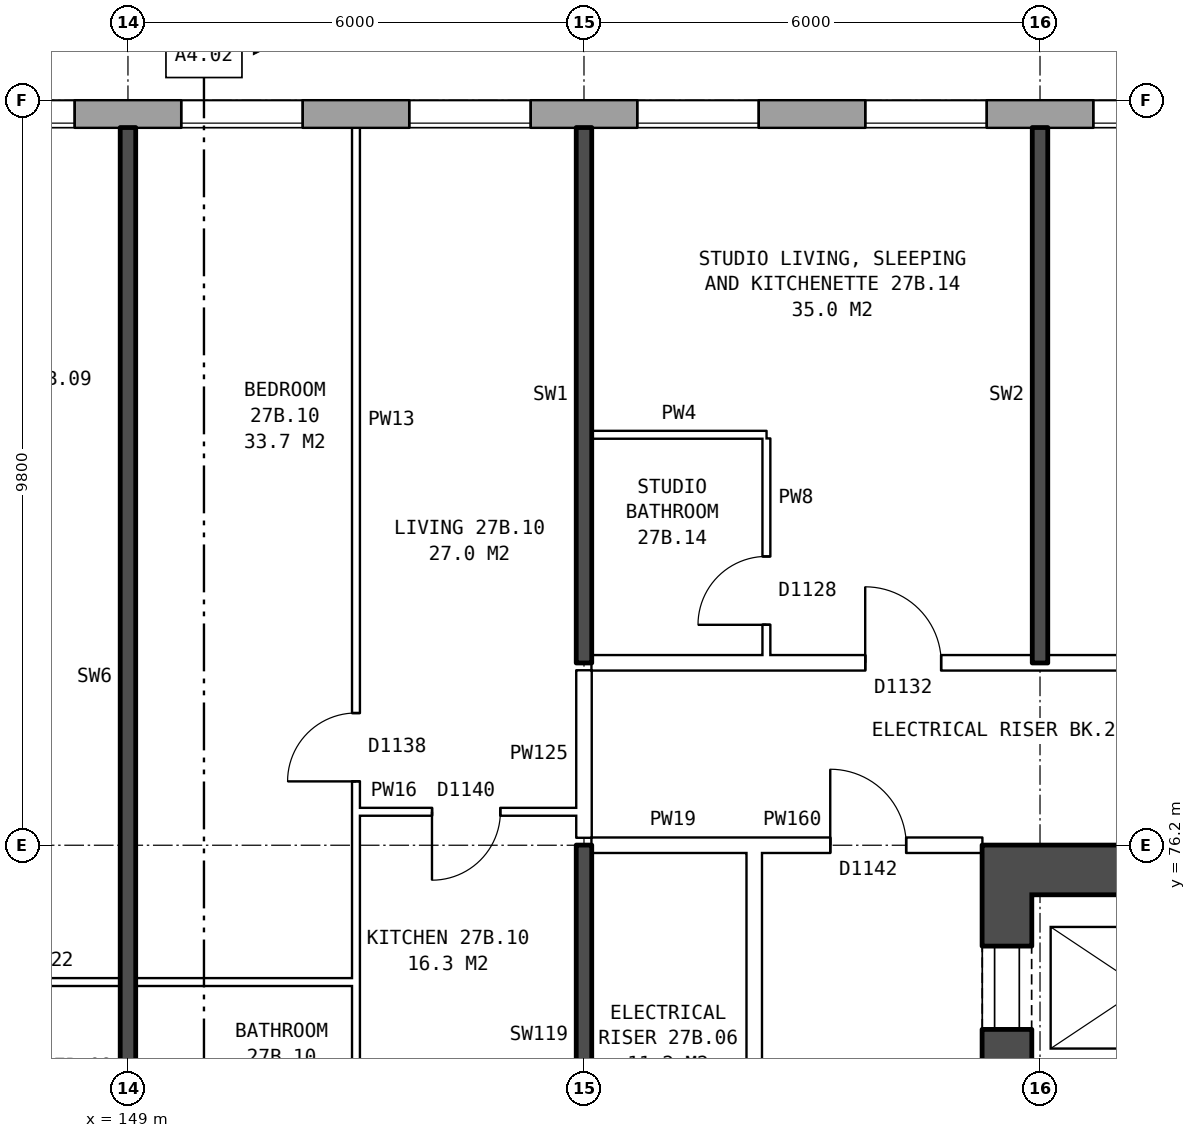
"""IFC4 building model, lengths in metres.
Left out: names, types, materials, properties, quantities, classifications, styles, units other than length and angle.
Written with IfcOpenShell. Run it as: python <this file> out.ifc"""

import sys

from ifc_helpers import new_model, si_unit, direction, frame, frame_2d, origin, place, context, subcontext, project, spatial, rectangle, extrude, element, fill, save


model = new_model("IFC4")
c1 = context("Model", 3, precision=1e-05, world=origin(), true_north=direction((0.0, 1.0)))
c2 = subcontext(c1, "Body", "Model", "MODEL_VIEW")
j1 = project(units=[si_unit("LENGTHUNIT", "METRE"), si_unit("PLANEANGLEUNIT", "RADIAN")], contexts=[c1])
p1 = place(None, origin())
s1 = spatial("IfcSite", under=j1, at=p1, CompositionType="ELEMENT")
p2 = place(p1, origin())
s2 = spatial("IfcBuilding", under=s1, at=p2, CompositionType="ELEMENT")
p3 = place(p2, frame((0.0, 0.0, 99.5)))
s3 = spatial("IfcBuildingStorey", under=s2, at=p3, CompositionType="ELEMENT", Elevation=99.5)
p4 = place(p3, frame((170.925, 85.82, 0.0), z_axis=(0.0, 0.0, 1.0), x_axis=(-1.0, 0.0, 0.0)))
e1 = element("IfcWall", 1, at=p4, inside=s3, PredefinedType="STANDARD", context=c2, shape_type="SweptSolid", body=[
    extrude(rectangle(XDim=36.851, YDim=0.36, at=frame_2d((18.425, 0.0))), origin(), (0.0, 0.0, 1.0), 2.85),
])
p5 = place(p4, frame((0.3, 0.0, 0.8)))
e2 = element("IfcOpeningElement", 2, at=p5, cuts=e1, PredefinedType="OPENING", context=c2, shape_type="SweptSolid", body=[
    extrude(rectangle(XDim=1.0, YDim=1.8, at=frame_2d((0.5, 0.9))), frame((0.0, 0.19, 0.0), z_axis=(0.0, -1.0, 0.0), x_axis=(1.0, 0.0, 0.0)), (0.0, 0.0, 1.0), 0.38),
])
p6 = place(p4, frame((4.625, 0.0, 0.8)))
e3 = element("IfcOpeningElement", 3, at=p6, cuts=e1, PredefinedType="OPENING", context=c2, shape_type="SweptSolid", body=[
    extrude(rectangle(XDim=1.6, YDim=1.8, at=frame_2d((0.8, 0.9))), frame((0.0, 0.19, 0.0), z_axis=(0.0, -1.0, 0.0), x_axis=(1.0, 0.0, 0.0)), (0.0, 0.0, 1.0), 0.38),
])
p7 = place(p4, frame((7.625, 0.0, 0.8)))
e4 = element("IfcOpeningElement", 4, at=p7, cuts=e1, PredefinedType="OPENING", context=c2, shape_type="SweptSolid", body=[
    extrude(rectangle(XDim=1.6, YDim=1.8, at=frame_2d((0.8, 0.9))), frame((0.0, 0.19, 0.0), z_axis=(0.0, -1.0, 0.0), x_axis=(1.0, 0.0, 0.0)), (0.0, 0.0, 1.0), 0.38),
])
p8 = place(p4, frame((10.625, 0.0, 0.8)))
e5 = element("IfcOpeningElement", 5, at=p8, cuts=e1, PredefinedType="OPENING", context=c2, shape_type="SweptSolid", body=[
    extrude(rectangle(XDim=1.6, YDim=1.8, at=frame_2d((0.8, 0.9))), frame((0.0, 0.19, 0.0), z_axis=(0.0, -1.0, 0.0), x_axis=(1.0, 0.0, 0.0)), (0.0, 0.0, 1.0), 0.38),
])
p9 = place(p4, frame((13.625, 0.0, 0.8)))
e6 = element("IfcOpeningElement", 6, at=p9, cuts=e1, PredefinedType="OPENING", context=c2, shape_type="SweptSolid", body=[
    extrude(rectangle(XDim=1.6, YDim=1.8, at=frame_2d((0.8, 0.9))), frame((0.0, 0.19, 0.0), z_axis=(0.0, -1.0, 0.0), x_axis=(1.0, 0.0, 0.0)), (0.0, 0.0, 1.0), 0.38),
])
p10 = place(p4, frame((16.625, 0.0, 0.8)))
e7 = element("IfcOpeningElement", 7, at=p10, cuts=e1, PredefinedType="OPENING", context=c2, shape_type="SweptSolid", body=[
    extrude(rectangle(XDim=1.6, YDim=1.8, at=frame_2d((0.8, 0.9))), frame((0.0, 0.19, 0.0), z_axis=(0.0, -1.0, 0.0), x_axis=(1.0, 0.0, 0.0)), (0.0, 0.0, 1.0), 0.38),
])
p11 = place(p4, frame((19.625, 0.0, 0.8)))
e8 = element("IfcOpeningElement", 8, at=p11, cuts=e1, PredefinedType="OPENING", context=c2, shape_type="SweptSolid", body=[
    extrude(rectangle(XDim=1.6, YDim=1.8, at=frame_2d((0.8, 0.9))), frame((0.0, 0.19, 0.0), z_axis=(0.0, -1.0, 0.0), x_axis=(1.0, 0.0, 0.0)), (0.0, 0.0, 1.0), 0.38),
])
p12 = place(p4, frame((22.625, 0.0, 0.8)))
e9 = element("IfcOpeningElement", 9, at=p12, cuts=e1, PredefinedType="OPENING", context=c2, shape_type="SweptSolid", body=[
    extrude(rectangle(XDim=1.6, YDim=1.8, at=frame_2d((0.8, 0.9))), frame((0.0, 0.19, 0.0), z_axis=(0.0, -1.0, 0.0), x_axis=(1.0, 0.0, 0.0)), (0.0, 0.0, 1.0), 0.38),
])
p13 = place(p4, frame((25.625, 0.0, 0.8)))
e10 = element("IfcOpeningElement", 10, at=p13, cuts=e1, PredefinedType="OPENING", context=c2, shape_type="SweptSolid", body=[
    extrude(rectangle(XDim=1.6, YDim=1.8, at=frame_2d((0.8, 0.9))), frame((0.0, 0.19, 0.0), z_axis=(0.0, -1.0, 0.0), x_axis=(1.0, 0.0, 0.0)), (0.0, 0.0, 1.0), 0.38),
])
p14 = place(p4, frame((28.625, 0.0, 0.8)))
e11 = element("IfcOpeningElement", 11, at=p14, cuts=e1, PredefinedType="OPENING", context=c2, shape_type="SweptSolid", body=[
    extrude(rectangle(XDim=1.6, YDim=1.8, at=frame_2d((0.8, 0.9))), frame((0.0, 0.19, 0.0), z_axis=(0.0, -1.0, 0.0), x_axis=(1.0, 0.0, 0.0)), (0.0, 0.0, 1.0), 0.38),
])
p15 = place(p4, frame((30.525, 0.0, 0.8)))
e12 = element("IfcOpeningElement", 12, at=p15, cuts=e1, PredefinedType="OPENING", context=c2, shape_type="SweptSolid", body=[
    extrude(rectangle(XDim=1.6, YDim=1.8, at=frame_2d((0.8, 0.9))), frame((0.0, 0.19, 0.0), z_axis=(0.0, -1.0, 0.0), x_axis=(1.0, 0.0, 0.0)), (0.0, 0.0, 1.0), 0.38),
])
p16 = place(p4, frame((34.425, 0.0, 1.7)))
e13 = element("IfcOpeningElement", 13, at=p16, cuts=e1, PredefinedType="OPENING", context=c2, shape_type="SweptSolid", body=[
    extrude(rectangle(XDim=0.8, YDim=0.9, at=frame_2d((0.4, 0.45))), frame((0.0, 0.19, 0.0), z_axis=(0.0, -1.0, 0.0), x_axis=(1.0, 0.0, 0.0)), (0.0, 0.0, 1.0), 0.38),
])
p17 = place(p4, frame((1.6, 0.0, 1.7)))
e14 = element("IfcOpeningElement", 14, at=p17, cuts=e1, PredefinedType="OPENING", context=c2, shape_type="SweptSolid", body=[
    extrude(rectangle(XDim=0.8, YDim=0.9, at=frame_2d((0.4, 0.45))), frame((0.0, 0.19, 0.0), z_axis=(0.0, -1.0, 0.0), x_axis=(1.0, 0.0, 0.0)), (0.0, 0.0, 1.0), 0.38),
])
p18 = place(p4, frame((32.425, 0.0, 0.8)))
e15 = element("IfcOpeningElement", 15, at=p18, cuts=e1, PredefinedType="OPENING", context=c2, shape_type="SweptSolid", body=[
    extrude(rectangle(XDim=0.8, YDim=0.9, at=frame_2d((0.4, 0.45))), frame((0.0, 0.19, 0.0), z_axis=(0.0, -1.0, 0.0), x_axis=(1.0, 0.0, 0.0)), (0.0, 0.0, 1.0), 0.38),
])
p19 = place(p4, frame((35.525, 0.0, 0.8)))
e16 = element("IfcOpeningElement", 16, at=p19, cuts=e1, PredefinedType="OPENING", context=c2, shape_type="SweptSolid", body=[
    extrude(rectangle(XDim=1.0, YDim=1.8, at=frame_2d((0.5, 0.9))), frame((0.0, 0.19, 0.0), z_axis=(0.0, -1.0, 0.0), x_axis=(1.0, 0.0, 0.0)), (0.0, 0.0, 1.0), 0.38),
])
p20 = place(p3, frame((160.565, 75.55, 0.0), z_axis=(0.0, 0.0, 1.0), x_axis=(0.0, -1.0, 0.0)))
e17 = element("IfcWall", 17, at=p20, inside=s3, PredefinedType="SHEAR", context=c2, shape_type="SweptSolid", body=[
    extrude(rectangle(XDim=11.1, YDim=0.65, at=frame_2d((5.55, 0.0))), origin(), (0.0, 0.0, 1.0), 2.85),
])
p21 = place(p20, frame((0.675, 0.0, 0.0)))
e18 = element("IfcOpeningElement", 18, at=p21, cuts=e17, PredefinedType="OPENING", context=c2, shape_type="SweptSolid", body=[
    extrude(rectangle(XDim=1.1, YDim=2.1, at=frame_2d((0.55, 1.05))), frame((0.0, 0.335, 0.0), z_axis=(0.0, -1.0, 0.0), x_axis=(1.0, 0.0, 0.0)), (0.0, 0.0, 1.0), 0.67),
])
p22 = place(p20, frame((2.95, 0.0, 0.0)))
e19 = element("IfcOpeningElement", 19, at=p22, cuts=e17, PredefinedType="OPENING", context=c2, shape_type="SweptSolid", body=[
    extrude(rectangle(XDim=1.1, YDim=2.1, at=frame_2d((0.55, 1.05))), frame((0.0, 0.335, 0.0), z_axis=(0.0, -1.0, 0.0), x_axis=(1.0, 0.0, 0.0)), (0.0, 0.0, 1.0), 0.67),
])
p23 = place(p20, frame((5.15, 0.0, 0.0)))
e20 = element("IfcOpeningElement", 20, at=p23, cuts=e17, PredefinedType="OPENING", context=c2, shape_type="SweptSolid", body=[
    extrude(rectangle(XDim=1.1, YDim=2.1, at=frame_2d((0.55, 1.05))), frame((0.0, 0.335, 0.0), z_axis=(0.0, -1.0, 0.0), x_axis=(1.0, 0.0, 0.0)), (0.0, 0.0, 1.0), 0.67),
])
p24 = place(p20, frame((9.25, 0.0, 0.0)))
e21 = element("IfcOpeningElement", 21, at=p24, cuts=e17, PredefinedType="OPENING", context=c2, shape_type="SweptSolid", body=[
    extrude(rectangle(XDim=1.1, YDim=2.1, at=frame_2d((0.55, 1.05))), frame((0.0, 0.335, 0.0), z_axis=(0.0, -1.0, 0.0), x_axis=(1.0, 0.0, 0.0)), (0.0, 0.0, 1.0), 0.67),
])
p25 = place(p20, frame((7.475, 0.0, 0.0)))
e22 = element("IfcOpeningElement", 22, at=p25, cuts=e17, PredefinedType="OPENING", context=c2, shape_type="SweptSolid", body=[
    extrude(rectangle(XDim=0.85, YDim=2.1, at=frame_2d((0.425, 1.05))), frame((0.0, 0.335, 0.0), z_axis=(0.0, -1.0, 0.0), x_axis=(1.0, 0.0, 0.0)), (0.0, 0.0, 1.0), 0.67),
])
p26 = place(p3, frame((160.24, 75.875, 0.0), z_axis=(0.0, 0.0, 1.0), x_axis=(1.0, 0.0, 0.0)))
e23 = element("IfcWall", 23, at=p26, inside=s3, PredefinedType="SHEAR", context=c2, shape_type="SweptSolid", body=[
    extrude(rectangle(XDim=8.4, YDim=0.65, at=frame_2d((4.2, 0.0))), origin(), (0.0, 0.0, 1.0), 2.85),
])
p27 = place(p3, frame((157.24, 63.9, 0.0), z_axis=(0.0, 0.0, 1.0), x_axis=(0.0, 1.0, 0.0)))
e24 = element("IfcWall", 24, at=p27, inside=s3, PredefinedType="PARTITIONING", context=c2, shape_type="SweptSolid", body=[
    extrude(rectangle(XDim=12.2, YDim=0.2, at=frame_2d((6.1, 0.0))), origin(), (0.0, 0.0, 1.0), 2.85),
])
p28 = place(p27, frame((5.1, 0.0, 0.0)))
e25 = element("IfcOpeningElement", 25, at=p28, cuts=e24, PredefinedType="OPENING", context=c2, shape_type="SweptSolid", body=[
    extrude(rectangle(XDim=2.0, YDim=2.1, at=frame_2d((1.0, 1.05))), frame((0.0, 0.11, 0.0), z_axis=(0.0, -1.0, 0.0), x_axis=(1.0, 0.0, 0.0)), (0.0, 0.0, 1.0), 0.22),
])
p29 = place(p3, frame((146.0, 74.4, 0.0), z_axis=(0.0, 0.0, 1.0), x_axis=(1.0, 0.0, 0.0)))
e26 = element("IfcWall", 26, at=p29, inside=s3, PredefinedType="PARTITIONING", context=c2, shape_type="SweptSolid", body=[
    extrude(rectangle(XDim=6.0, YDim=0.1, at=frame_2d((3.0, 0.0))), origin(), (0.0, 0.0, 1.0), 2.85),
])
p30 = place(p3, frame((155.1, 76.2, 0.0), z_axis=(0.0, 0.0, 1.0), x_axis=(1.0, 0.0, 0.0)))
e27 = element("IfcWall", 27, at=p30, inside=s3, PredefinedType="PARTITIONING", context=c2, shape_type="SweptSolid", body=[
    extrude(rectangle(XDim=2.14, YDim=0.2, at=frame_2d((1.07, 0.0))), origin(), (0.0, 0.0, 1.0), 2.85),
])
p31 = place(p3, frame((157.24, 76.2, 0.0), z_axis=(0.0, 0.0, 1.0), x_axis=(1.0, 0.0, 0.0)))
e28 = element("IfcWall", 28, at=p31, inside=s3, PredefinedType="PARTITIONING", context=c2, shape_type="SweptSolid", body=[
    extrude(rectangle(XDim=3.0, YDim=0.2, at=frame_2d((1.5, 0.0))), origin(), (0.0, 0.0, 1.0), 2.85),
])
p32 = place(p31, frame((1.0, 0.0, 0.0)))
e29 = element("IfcOpeningElement", 29, at=p32, cuts=e28, PredefinedType="OPENING", context=c2, shape_type="SweptSolid", body=[
    extrude(rectangle(XDim=1.0, YDim=2.1, at=frame_2d((0.5, 1.05))), frame((0.0, 0.11, 0.0), z_axis=(0.0, -1.0, 0.0), x_axis=(1.0, 0.0, 0.0)), (0.0, 0.0, 1.0), 0.22),
])
p33 = place(p3, frame((152.0, 76.64, 0.0), z_axis=(0.0, 0.0, 1.0), x_axis=(1.0, 0.0, 0.0)))
e30 = element("IfcWall", 30, at=p33, inside=s3, PredefinedType="PARTITIONING", context=c2, shape_type="SweptSolid", body=[
    extrude(rectangle(XDim=2.9, YDim=0.1, at=frame_2d((1.45, 0.0))), origin(), (0.0, 0.0, 1.0), 2.85),
])
p34 = place(p33, frame((1.0, 0.0, 0.0)))
e31 = element("IfcOpeningElement", 31, at=p34, cuts=e30, PredefinedType="OPENING", context=c2, shape_type="SweptSolid", body=[
    extrude(rectangle(XDim=0.9, YDim=2.1, at=frame_2d((0.45, 1.05))), frame((0.0, 0.06, 0.0), z_axis=(0.0, -1.0, 0.0), x_axis=(1.0, 0.0, 0.0)), (0.0, 0.0, 1.0), 0.12),
])
p35 = place(p3, frame((155.1, 78.6, 0.0), z_axis=(0.0, 0.0, 1.0), x_axis=(1.0, 0.0, 0.0)))
e32 = element("IfcWall", 32, at=p35, inside=s3, PredefinedType="PARTITIONING", context=c2, shape_type="SweptSolid", body=[
    extrude(rectangle(XDim=18.54, YDim=0.2, at=frame_2d((9.27, 0.0))), origin(), (0.0, 0.0, 1.0), 2.85),
])
p36 = place(p35, frame((3.6, 0.0, 0.0)))
e33 = element("IfcOpeningElement", 33, at=p36, cuts=e32, PredefinedType="OPENING", context=c2, shape_type="SweptSolid", body=[
    extrude(rectangle(XDim=1.0, YDim=2.1, at=frame_2d((0.5, 1.05))), frame((0.0, 0.11, 0.0), z_axis=(0.0, -1.0, 0.0), x_axis=(1.0, 0.0, 0.0)), (0.0, 0.0, 1.0), 0.22),
])
p37 = place(p35, frame((7.4, 0.0, 0.0)))
e34 = element("IfcOpeningElement", 34, at=p37, cuts=e32, PredefinedType="OPENING", context=c2, shape_type="SweptSolid", body=[
    extrude(rectangle(XDim=1.0, YDim=2.1, at=frame_2d((0.5, 1.05))), frame((0.0, 0.11, 0.0), z_axis=(0.0, -1.0, 0.0), x_axis=(1.0, 0.0, 0.0)), (0.0, 0.0, 1.0), 0.22),
])
p38 = place(p35, frame((15.92, 0.0, 0.0)))
e35 = element("IfcOpeningElement", 35, at=p38, cuts=e32, PredefinedType="OPENING", context=c2, shape_type="SweptSolid", body=[
    extrude(rectangle(XDim=1.0, YDim=2.1, at=frame_2d((0.5, 1.05))), frame((0.0, 0.11, 0.0), z_axis=(0.0, -1.0, 0.0), x_axis=(1.0, 0.0, 0.0)), (0.0, 0.0, 1.0), 0.22),
])
p39 = place(p3, frame((155.1, 81.6, 0.0), z_axis=(0.0, 0.0, 1.0), x_axis=(1.0, 0.0, 0.0)))
e36 = element("IfcWall", 36, at=p39, inside=s3, PredefinedType="PARTITIONING", context=c2, shape_type="SweptSolid", body=[
    extrude(rectangle(XDim=2.3, YDim=0.1, at=frame_2d((1.15, 0.0))), origin(), (0.0, 0.0, 1.0), 2.85),
])
p40 = place(p3, frame((149.0, 71.2, 0.0), z_axis=(0.0, 0.0, 1.0), x_axis=(0.0, 1.0, 0.0)))
e37 = element("IfcWall", 37, at=p40, inside=s3, PredefinedType="SOLIDWALL", context=c2, shape_type="SweptSolid", body=[
    extrude(rectangle(XDim=14.44, YDim=0.2, at=frame_2d((7.22, 0.0))), origin(), (0.0, 0.0, 1.0), 2.85),
])
p41 = place(p3, frame((152.0, 71.3, 0.0), z_axis=(0.0, 0.0, 1.0), x_axis=(0.0, 1.0, 0.0)))
e38 = element("IfcWall", 38, at=p41, inside=s3, PredefinedType="PARTITIONING", context=c2, shape_type="SweptSolid", body=[
    extrude(rectangle(XDim=14.34, YDim=0.1, at=frame_2d((7.17, 0.0))), origin(), (0.0, 0.0, 1.0), 2.85),
])
p42 = place(p41, frame((5.74, 0.0, 0.0)))
e39 = element("IfcOpeningElement", 39, at=p42, cuts=e38, PredefinedType="OPENING", context=c2, shape_type="SweptSolid", body=[
    extrude(rectangle(XDim=0.9, YDim=2.1, at=frame_2d((0.45, 1.05))), frame((0.0, 0.06, 0.0), z_axis=(0.0, -1.0, 0.0), x_axis=(1.0, 0.0, 0.0)), (0.0, 0.0, 1.0), 0.12),
])
p43 = place(p41, frame((0.4, 0.0, 0.0)))
e40 = element("IfcOpeningElement", 40, at=p43, cuts=e38, PredefinedType="OPENING", context=c2, shape_type="SweptSolid", body=[
    extrude(rectangle(XDim=0.9, YDim=2.1, at=frame_2d((0.45, 1.05))), frame((0.0, 0.06, 0.0), z_axis=(0.0, -1.0, 0.0), x_axis=(1.0, 0.0, 0.0)), (0.0, 0.0, 1.0), 0.12),
])
p44 = place(p3, frame((155.0, 71.2, 0.0), z_axis=(0.0, 0.0, 1.0), x_axis=(0.0, 1.0, 0.0)))
e41 = element("IfcWall", 41, at=p44, inside=s3, PredefinedType="SOLIDWALL", context=c2, shape_type="SweptSolid", body=[
    extrude(rectangle(XDim=5.0, YDim=0.2, at=frame_2d((2.5, 0.0))), origin(), (0.0, 0.0, 1.0), 2.85),
])
p45 = place(p3, frame((155.0, 76.3, 0.0), z_axis=(0.0, 0.0, 1.0), x_axis=(0.0, 1.0, 0.0)))
e42 = element("IfcWall", 42, at=p45, inside=s3, PredefinedType="PARTITIONING", context=c2, shape_type="SweptSolid", body=[
    extrude(rectangle(XDim=2.2, YDim=0.2, at=frame_2d((1.1, 0.0))), origin(), (0.0, 0.0, 1.0), 2.85),
])
p46 = place(p3, frame((155.0, 78.6, 0.0), z_axis=(0.0, 0.0, 1.0), x_axis=(0.0, 1.0, 0.0)))
e43 = element("IfcWall", 43, at=p46, inside=s3, PredefinedType="SOLIDWALL", context=c2, shape_type="SweptSolid", body=[
    extrude(rectangle(XDim=7.04, YDim=0.2, at=frame_2d((3.52, 0.0))), origin(), (0.0, 0.0, 1.0), 2.85),
])
p47 = place(p3, frame((157.4, 78.7, 0.0), z_axis=(0.0, 0.0, 1.0), x_axis=(0.0, 1.0, 0.0)))
e44 = element("IfcWall", 44, at=p47, inside=s3, PredefinedType="PARTITIONING", context=c2, shape_type="SweptSolid", body=[
    extrude(rectangle(XDim=2.85, YDim=0.1, at=frame_2d((1.425, 0.0))), origin(), (0.0, 0.0, 1.0), 2.85),
])
p48 = place(p47, frame((0.4, 0.0, 0.0)))
e45 = element("IfcOpeningElement", 45, at=p48, cuts=e44, PredefinedType="OPENING", context=c2, shape_type="SweptSolid", body=[
    extrude(rectangle(XDim=0.9, YDim=2.1, at=frame_2d((0.45, 1.05))), frame((0.0, 0.06, 0.0), z_axis=(0.0, -1.0, 0.0), x_axis=(1.0, 0.0, 0.0)), (0.0, 0.0, 1.0), 0.12),
])
p49 = place(p3, frame((161.0, 78.6, 0.0), z_axis=(0.0, 0.0, 1.0), x_axis=(0.0, 1.0, 0.0)))
e46 = element("IfcWall", 46, at=p49, inside=s3, PredefinedType="SOLIDWALL", context=c2, shape_type="SweptSolid", body=[
    extrude(rectangle(XDim=7.04, YDim=0.2, at=frame_2d((3.52, 0.0))), origin(), (0.0, 0.0, 1.0), 2.85),
])
p50 = place(p7, origin())
e47 = element("IfcWindow", 47, at=p50, inside=s3, PartitioningType="SINGLE_PANEL", PredefinedType="WINDOW", context=c2, shape_type="SweptSolid", body=[
    extrude(rectangle(XDim=1.6, YDim=1.8, at=frame_2d((0.8, 0.9))), frame((0.0, 0.15, 0.0), z_axis=(0.0, -1.0, 0.0), x_axis=(1.0, 0.0, 0.0)), (0.0, 0.0, 1.0), 0.06),
])
fill(e4, e47)
p51 = place(p8, origin())
e48 = element("IfcWindow", 48, at=p51, inside=s3, PartitioningType="SINGLE_PANEL", PredefinedType="WINDOW", context=c2, shape_type="SweptSolid", body=[
    extrude(rectangle(XDim=1.6, YDim=1.8, at=frame_2d((0.8, 0.9))), frame((0.0, 0.15, 0.0), z_axis=(0.0, -1.0, 0.0), x_axis=(1.0, 0.0, 0.0)), (0.0, 0.0, 1.0), 0.06),
])
fill(e5, e48)
p52 = place(p9, origin())
e49 = element("IfcWindow", 49, at=p52, inside=s3, PartitioningType="SINGLE_PANEL", PredefinedType="WINDOW", context=c2, shape_type="SweptSolid", body=[
    extrude(rectangle(XDim=1.6, YDim=1.8, at=frame_2d((0.8, 0.9))), frame((0.0, 0.15, 0.0), z_axis=(0.0, -1.0, 0.0), x_axis=(1.0, 0.0, 0.0)), (0.0, 0.0, 1.0), 0.06),
])
fill(e6, e49)
p53 = place(p10, origin())
e50 = element("IfcWindow", 50, at=p53, inside=s3, PartitioningType="SINGLE_PANEL", PredefinedType="WINDOW", context=c2, shape_type="SweptSolid", body=[
    extrude(rectangle(XDim=1.6, YDim=1.8, at=frame_2d((0.8, 0.9))), frame((0.0, 0.15, 0.0), z_axis=(0.0, -1.0, 0.0), x_axis=(1.0, 0.0, 0.0)), (0.0, 0.0, 1.0), 0.06),
])
fill(e7, e50)
p54 = place(p11, origin())
e51 = element("IfcWindow", 51, at=p54, inside=s3, PartitioningType="SINGLE_PANEL", PredefinedType="WINDOW", context=c2, shape_type="SweptSolid", body=[
    extrude(rectangle(XDim=1.6, YDim=1.8, at=frame_2d((0.8, 0.9))), frame((0.0, 0.15, 0.0), z_axis=(0.0, -1.0, 0.0), x_axis=(1.0, 0.0, 0.0)), (0.0, 0.0, 1.0), 0.06),
])
fill(e8, e51)
p55 = place(p12, origin())
e52 = element("IfcWindow", 52, at=p55, inside=s3, PartitioningType="SINGLE_PANEL", PredefinedType="WINDOW", context=c2, shape_type="SweptSolid", body=[
    extrude(rectangle(XDim=1.6, YDim=1.8, at=frame_2d((0.8, 0.9))), frame((0.0, 0.15, 0.0), z_axis=(0.0, -1.0, 0.0), x_axis=(1.0, 0.0, 0.0)), (0.0, 0.0, 1.0), 0.06),
])
fill(e9, e52)
p56 = place(p21, origin())
e53 = element("IfcDoor", 53, at=p56, inside=s3, OperationType="DOUBLE_DOOR_SLIDING", PredefinedType="DOOR", context=c2, shape_type="SweptSolid", body=[
    extrude(rectangle(XDim=1.1, YDim=2.1, at=frame_2d((0.55, 1.05))), frame((0.0, 0.31, 0.0), z_axis=(0.0, -1.0, 0.0), x_axis=(1.0, 0.0, 0.0)), (0.0, 0.0, 1.0), 0.05),
])
fill(e18, e53)
p57 = place(p32, origin())
e54 = element("IfcDoor", 54, at=p57, inside=s3, OperationType="SINGLE_SWING_LEFT", PredefinedType="DOOR", context=c2, shape_type="SweptSolid", body=[
    extrude(rectangle(XDim=1.0, YDim=2.1, at=frame_2d((0.5, 1.05))), frame((0.0, 0.025, 0.0), z_axis=(0.0, -1.0, 0.0), x_axis=(1.0, 0.0, 0.0)), (0.0, 0.0, 1.0), 0.05),
])
fill(e29, e54)
p58 = place(p42, origin())
e55 = element("IfcDoor", 55, at=p58, inside=s3, OperationType="SINGLE_SWING_LEFT", PredefinedType="DOOR", context=c2, shape_type="SweptSolid", body=[
    extrude(rectangle(XDim=0.9, YDim=2.1, at=frame_2d((0.45, 1.05))), frame((0.0, 0.025, 0.0), z_axis=(0.0, -1.0, 0.0), x_axis=(1.0, 0.0, 0.0)), (0.0, 0.0, 1.0), 0.05),
])
fill(e39, e55)
p59 = place(p34, frame((0.9, 0.0, 0.0), z_axis=(0.0, 0.0, 1.0), x_axis=(-1.0, 0.0, 0.0)))
e56 = element("IfcDoor", 56, at=p59, inside=s3, OperationType="SINGLE_SWING_RIGHT", PredefinedType="DOOR", context=c2, shape_type="SweptSolid", body=[
    extrude(rectangle(XDim=0.9, YDim=2.1, at=frame_2d((0.45, 1.05))), frame((0.0, 0.025, 0.0), z_axis=(0.0, -1.0, 0.0), x_axis=(1.0, 0.0, 0.0)), (0.0, 0.0, 1.0), 0.05),
])
fill(e31, e56)
p60 = place(p36, origin())
e57 = element("IfcDoor", 57, at=p60, inside=s3, OperationType="SINGLE_SWING_LEFT", PredefinedType="DOOR", context=c2, shape_type="SweptSolid", body=[
    extrude(rectangle(XDim=1.0, YDim=2.1, at=frame_2d((0.5, 1.05))), frame((0.0, 0.025, 0.0), z_axis=(0.0, -1.0, 0.0), x_axis=(1.0, 0.0, 0.0)), (0.0, 0.0, 1.0), 0.05),
])
fill(e33, e57)
p61 = place(p48, origin())
e58 = element("IfcDoor", 58, at=p61, inside=s3, OperationType="SINGLE_SWING_LEFT", PredefinedType="DOOR", context=c2, shape_type="SweptSolid", body=[
    extrude(rectangle(XDim=0.9, YDim=2.1, at=frame_2d((0.45, 1.05))), frame((0.0, 0.025, 0.0), z_axis=(0.0, -1.0, 0.0), x_axis=(1.0, 0.0, 0.0)), (0.0, 0.0, 1.0), 0.05),
])
fill(e45, e58)
save(model, sys.argv[1])
